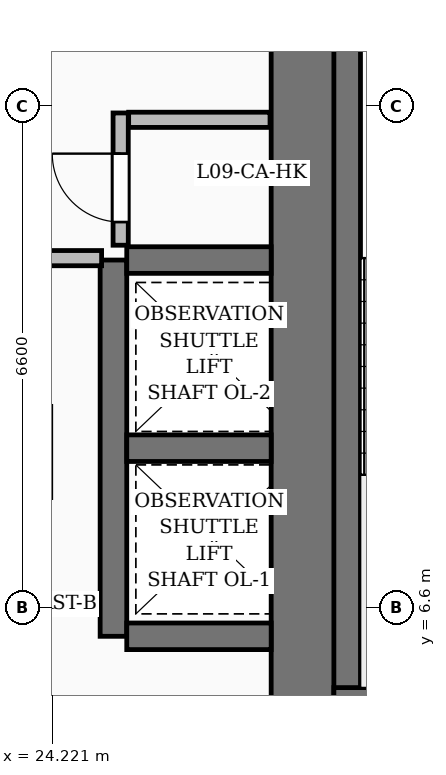
"""IFC4 building model, lengths in metres.
Left out: names, types, materials, properties, quantities, classifications, styles, units other than length and angle.
Written with IfcOpenShell. Run it as: python <this file> out.ifc"""

import sys

from ifc_helpers import new_model, si_unit, direction, frame, frame_2d, origin, place, context, subcontext, project, spatial, rectangle, extrude, element, fill, save


model = new_model("IFC4")
c1 = context("Model", 3, precision=1e-05, world=origin(), true_north=direction((0.0, 1.0)))
c2 = subcontext(c1, "Body", "Model", "MODEL_VIEW")
j1 = project(units=[si_unit("LENGTHUNIT", "METRE"), si_unit("PLANEANGLEUNIT", "RADIAN")], contexts=[c1])
p1 = place(None, origin())
s1 = spatial("IfcSite", under=j1, at=p1, CompositionType="ELEMENT")
p2 = place(p1, origin())
s2 = spatial("IfcBuilding", under=s1, at=p2, CompositionType="ELEMENT")
p3 = place(p2, frame((0.0, 0.0, 42.6)))
s3 = spatial("IfcBuildingStorey", under=s2, at=p3, CompositionType="ELEMENT", Elevation=42.6)
p4 = place(p3, frame((27.55, 5.25, 0.0), z_axis=(0.0, 0.0, 1.0), x_axis=(0.0, 1.0, 0.0)))
e1 = element("IfcWall", 1, at=p4, inside=s3, PredefinedType="SHEAR", context=c2, shape_type="SweptSolid", body=[
    extrude(rectangle(XDim=8.8, YDim=0.9, at=frame_2d((4.4, 0.0))), origin(), (0.0, 0.0, 1.0), 3.6),
])
p5 = place(p3, frame((28.1, 5.2, 0.0), z_axis=(0.0, 0.0, 1.0), x_axis=(0.0, 1.0, 0.0)))
e2 = element("IfcWall", 2, at=p5, inside=s3, PredefinedType="SOLIDWALL", context=c2, shape_type="SweptSolid", body=[
    extrude(rectangle(XDim=9.1, YDim=0.35, at=frame_2d((4.55, 0.0))), origin(), (0.0, 0.0, 1.0), 3.6),
])
p6 = place(p3, frame((27.925, 5.375, 0.0), z_axis=(0.0, 0.0, 1.0), x_axis=(1.0, 0.0, 0.0)))
e3 = element("IfcWall", 3, at=p6, inside=s3, PredefinedType="SOLIDWALL", context=c2, shape_type="SweptSolid", body=[
    extrude(rectangle(XDim=3.55, YDim=0.35, at=frame_2d((1.775, 0.0))), origin(), (0.0, 0.0, 1.0), 3.6),
])
p7 = place(p3, frame((25.025, 6.225, 0.0), z_axis=(0.0, 0.0, 1.0), x_axis=(0.0, 1.0, 0.0)))
e4 = element("IfcWall", 4, at=p7, inside=s3, PredefinedType="SOLIDWALL", context=c2, shape_type="SweptSolid", body=[
    extrude(rectangle(XDim=4.95, YDim=0.35, at=frame_2d((2.475, 0.0))), origin(), (0.0, 0.0, 1.0), 3.6),
])
for number, where, z_axis, x_axis in (
    (5, (25.2, 6.225, 0.0), (0.0, 0.0, 1.0), (1.0, 0.0, 0.0)),
    (6, (25.2, 8.7, 0.0), (0.0, 0.0, 1.0), (1.0, 0.0, 0.0)),
    (7, (25.2, 11.175, 0.0), (0.0, 0.0, 1.0), (1.0, 0.0, 0.0)),
):
    element("IfcWall", number, at=place(p3, frame(where, z_axis=z_axis, x_axis=x_axis)), inside=s3, PredefinedType="SOLIDWALL", context=c2, shape_type="SweptSolid", body=[
        extrude(rectangle(XDim=1.9, YDim=0.35, at=frame_2d((0.95, 0.0))), origin(), (0.0, 0.0, 1.0), 3.6),
    ])
p8 = place(p3, frame((25.12, 11.37, 0.0), z_axis=(0.0, 0.0, 1.0), x_axis=(0.0, 1.0, 0.0)))
e8 = element("IfcWall", 8, at=p8, inside=s3, PredefinedType="PARTITIONING", context=c2, shape_type="SweptSolid", body=[
    extrude(rectangle(XDim=1.74, YDim=0.2, at=frame_2d((0.87, 0.0))), origin(), (0.0, 0.0, 1.0), 3.35),
])
p9 = place(p8, frame((0.305, 0.0, 0.0)))
e9 = element("IfcOpeningElement", 9, at=p9, cuts=e8, PredefinedType="OPENING", context=c2, shape_type="SweptSolid", body=[
    extrude(rectangle(XDim=0.9, YDim=2.1, at=frame_2d((0.45, 1.05))), frame((0.0, 0.11, 0.0), z_axis=(0.0, -1.0, 0.0), x_axis=(1.0, 0.0, 0.0)), (0.0, 0.0, 1.0), 0.22),
])
p10 = place(p3, frame((25.225, 13.02, 0.0), z_axis=(0.0, 0.0, 1.0), x_axis=(1.0, 0.0, 0.0)))
e10 = element("IfcWall", 10, at=p10, inside=s3, PredefinedType="PARTITIONING", context=c2, shape_type="SweptSolid", body=[
    extrude(rectangle(XDim=1.86, YDim=0.2, at=frame_2d((0.93, 0.0))), origin(), (0.0, 0.0, 1.0), 3.35),
])
p11 = place(p3, frame((21.485, 11.2, 0.0), z_axis=(0.0, 0.0, 1.0), x_axis=(1.0, 0.0, 0.0)))
e11 = element("IfcWall", 11, at=p11, inside=s3, PredefinedType="PARTITIONING", context=c2, shape_type="SweptSolid", body=[
    extrude(rectangle(XDim=3.384, YDim=0.2, at=frame_2d((1.692, 0.0))), origin(), (0.0, 0.0, 1.0), 2.787),
])
p12 = place(p11, frame((0.89, 0.0, 0.0)))
e12 = element("IfcOpeningElement", 12, at=p12, cuts=e11, PredefinedType="OPENING", context=c2, shape_type="SweptSolid", body=[
    extrude(rectangle(XDim=1.6, YDim=2.3, at=frame_2d((0.8, 1.15))), frame((0.0, 0.11, 0.0), z_axis=(0.0, -1.0, 0.0), x_axis=(1.0, 0.0, 0.0)), (0.0, 0.0, 1.0), 0.22),
])
p13 = place(p9, origin())
e13 = element("IfcDoor", 13, at=p13, inside=s3, OperationType="SINGLE_SWING_RIGHT", PredefinedType="DOOR", context=c2, shape_type="SweptSolid", body=[
    extrude(rectangle(XDim=0.9, YDim=2.1, at=frame_2d((0.45, 1.05))), frame((0.0, 0.025, 0.0), z_axis=(0.0, -1.0, 0.0), x_axis=(1.0, 0.0, 0.0)), (0.0, 0.0, 1.0), 0.05),
])
fill(e9, e13)
save(model, sys.argv[1])
